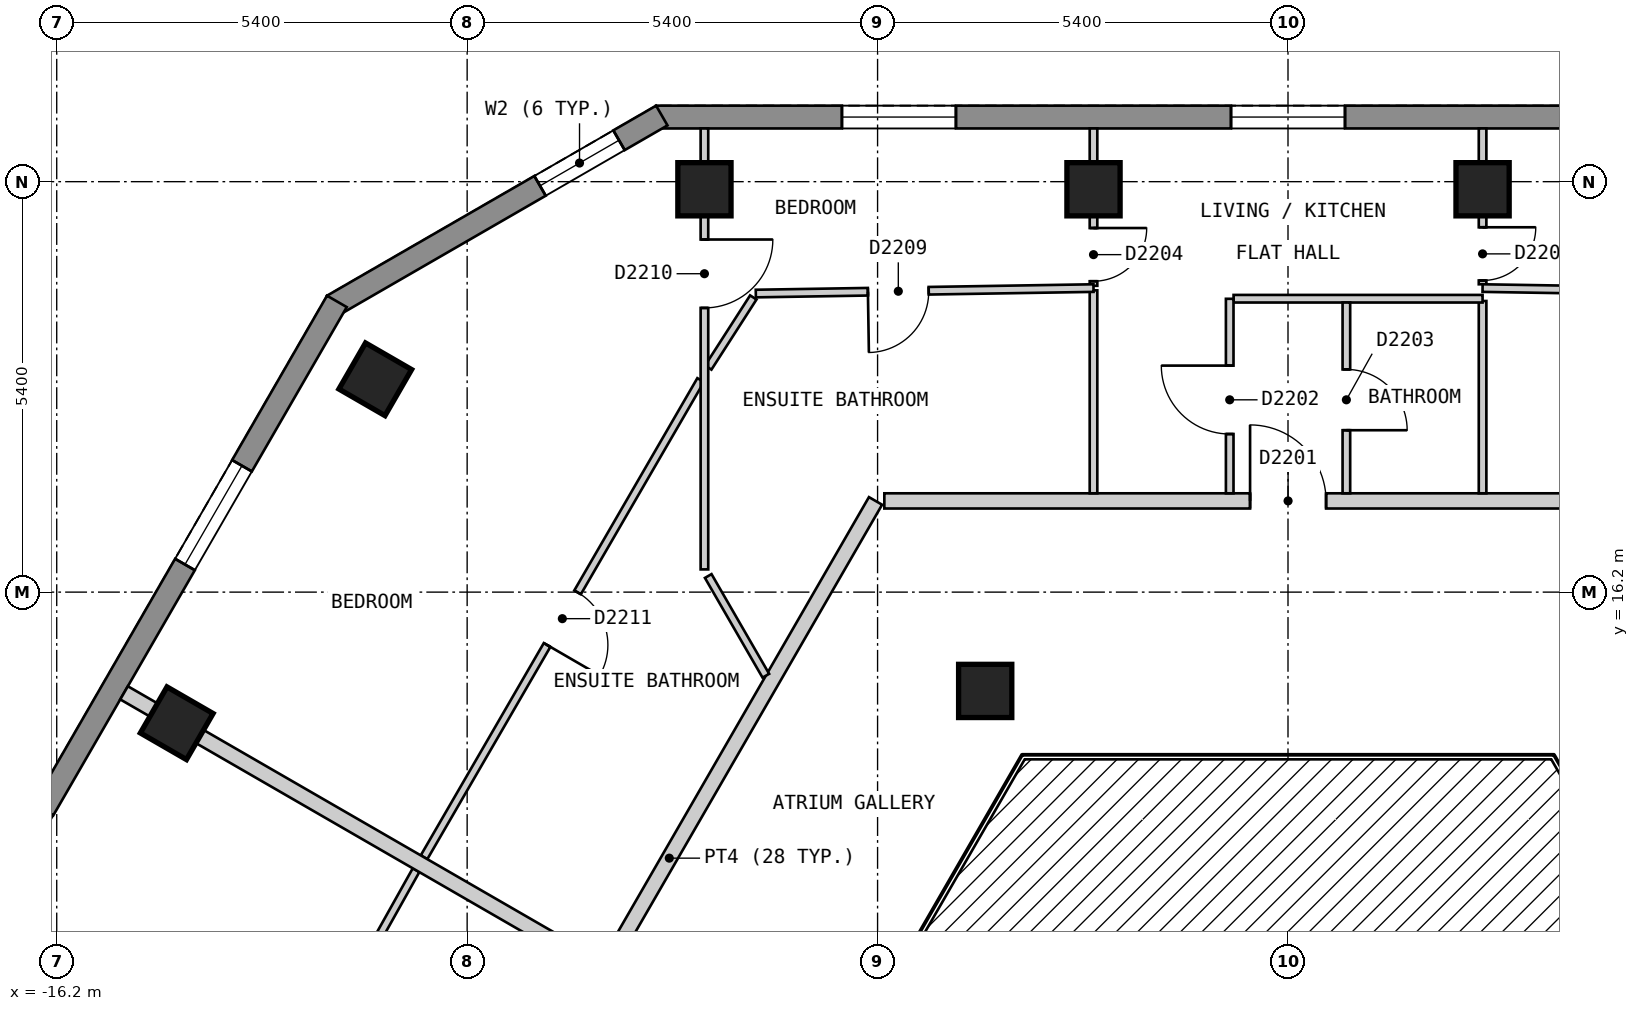
"""IFC4 building model, lengths in metres.
Left out: names, types, materials, properties, quantities, classifications, styles, units other than length and angle.
Written with IfcOpenShell. Run it as: python <this file> out.ifc"""

import sys

from ifc_helpers import new_model, si_unit, direction, frame, frame_2d, origin, origin_2d, place, context, subcontext, project, spatial, polyline, rectangle, outline, extrude, element, fill, save


model = new_model("IFC4")
c1 = context("Model", 3, precision=1e-05, world=origin(), true_north=direction((0.0, 1.0)))
c2 = subcontext(c1, "Body", "Model", "MODEL_VIEW")
j1 = project(units=[si_unit("LENGTHUNIT", "METRE"), si_unit("PLANEANGLEUNIT", "RADIAN")], contexts=[c1])
p1 = place(None, origin())
s1 = spatial("IfcSite", under=j1, at=p1, CompositionType="ELEMENT")
p2 = place(p1, origin())
s2 = spatial("IfcBuilding", under=s1, at=p2, CompositionType="ELEMENT")
p3 = place(p2, frame((0.0, 0.0, 223.8)))
s3 = spatial("IfcBuildingStorey", under=s2, at=p3, CompositionType="ELEMENT", Elevation=223.8)
for number, where, z_axis, x_axis in (
    (1, (2.56, 21.5, 0.0), (0.0, 0.0, 1.0), (-1.0, 0.0, 0.0)),
    (2, (-2.559, 21.5, 0.0), (0.0, 0.0, 1.0), (-1.0, 0.0, 0.0)),
    (3, (-7.678, 21.5, 0.0), (0.0, 0.0, 1.0), (-1.0, 0.0, 0.0)),
    (4, (-12.009, 19.0, 0.0), (0.0, 0.0, 1.0), (-0.5, -0.866, 0.0)),
    (5, (-14.621, 14.475, 0.0), (0.0, 0.0, 1.0), (-0.5, -0.866, 0.0)),
    (6, (-3.984, 14.9, 0.0), (0.0, 0.0, 1.0), (1.0, 0.0, 0.0)),
):
    element("IfcColumn", number, at=place(p3, frame(where, z_axis=z_axis, x_axis=x_axis)), inside=s3, PredefinedType="COLUMN", context=c2, shape_type="SweptSolid", body=[
        extrude(rectangle(XDim=0.7, YDim=0.7, at=origin_2d()), origin(), (0.0, 0.0, 1.0), 3.0),
    ])
p4 = place(p3, frame((8.314, 22.45, 0.0), z_axis=(0.0, 0.0, 1.0), x_axis=(-1.0, 0.0, 0.0)))
e7 = element("IfcWall", 7, at=p4, inside=s3, PredefinedType="SOLIDWALL", context=c2, shape_type="SweptSolid", body=[
    extrude(outline(polyline([(0.0, -0.15), (16.628, -0.15), (16.548, 0.15), (0.08, 0.15), (0.0, -0.15)])), origin(), (0.0, 0.0, 1.0), 2.7),
])
p5 = place(p4, frame((2.444, 0.0, 0.15)))
e8 = element("IfcOpeningElement", 8, at=p5, cuts=e7, PredefinedType="OPENING", context=c2, shape_type="SweptSolid", body=[
    extrude(rectangle(XDim=1.5, YDim=2.1, at=frame_2d((0.75, 1.05))), frame((0.0, 0.16, 0.0), z_axis=(0.0, -1.0, 0.0), x_axis=(1.0, 0.0, 0.0)), (0.0, 0.0, 1.0), 0.32),
])
p6 = place(p4, frame((7.564, 0.0, 0.15)))
e9 = element("IfcOpeningElement", 9, at=p6, cuts=e7, PredefinedType="OPENING", context=c2, shape_type="SweptSolid", body=[
    extrude(rectangle(XDim=1.5, YDim=2.1, at=frame_2d((0.75, 1.05))), frame((0.0, 0.16, 0.0), z_axis=(0.0, -1.0, 0.0), x_axis=(1.0, 0.0, 0.0)), (0.0, 0.0, 1.0), 0.32),
])
p7 = place(p4, frame((12.683, 0.0, 0.15)))
e10 = element("IfcOpeningElement", 10, at=p7, cuts=e7, PredefinedType="OPENING", context=c2, shape_type="SweptSolid", body=[
    extrude(rectangle(XDim=1.5, YDim=2.1, at=frame_2d((0.75, 1.05))), frame((0.0, 0.16, 0.0), z_axis=(0.0, -1.0, 0.0), x_axis=(1.0, 0.0, 0.0)), (0.0, 0.0, 1.0), 0.32),
])
p8 = place(p3, frame((-8.239, 22.47, 0.0), z_axis=(0.0, 0.0, 1.0), x_axis=(-0.866022959057, -0.500004234368, 0.0)))
e11 = element("IfcWall", 11, at=p8, inside=s3, PredefinedType="SOLIDWALL", context=c2, shape_type="SweptSolid", body=[
    extrude(outline(polyline([(0.0, -0.15), (5.0, -0.15), (4.92, 0.15), (0.08, 0.15), (0.0, -0.15)])), origin(), (0.0, 0.0, 1.0), 2.7),
])
p9 = place(p8, frame((0.65, 0.0, 0.15)))
e12 = element("IfcOpeningElement", 12, at=p9, cuts=e11, PredefinedType="OPENING", context=c2, shape_type="SweptSolid", body=[
    extrude(rectangle(XDim=1.2, YDim=2.1, at=frame_2d((0.6, 1.05))), frame((0.0, 0.16, 0.0), z_axis=(0.0, -1.0, 0.0), x_axis=(1.0, 0.0, 0.0)), (0.0, 0.0, 1.0), 0.32),
])
p10 = place(p3, frame((-12.514, 20.025, 0.0), z_axis=(0.0, 0.0, 1.0), x_axis=(-0.500003656944, -0.866023292436, 0.0)))
e13 = element("IfcWall", 13, at=p10, inside=s3, PredefinedType="SOLIDWALL", context=c2, shape_type="SweptSolid", body=[
    extrude(outline(polyline([(0.0, -0.15), (22.17, -0.15), (22.09, 0.15), (0.08, 0.15), (0.0, -0.15)])), origin(), (0.0, 0.0, 1.0), 2.7),
])
p11 = place(p10, frame((2.497, 0.0, 0.15)))
e14 = element("IfcOpeningElement", 14, at=p11, cuts=e13, PredefinedType="OPENING", context=c2, shape_type="SweptSolid", body=[
    extrude(rectangle(XDim=1.5, YDim=2.1, at=frame_2d((0.75, 1.05))), frame((0.0, 0.16, 0.0), z_axis=(0.0, -1.0, 0.0), x_axis=(1.0, 0.0, 0.0)), (0.0, 0.0, 1.0), 0.32),
])
p12 = place(p10, frame((7.722, 0.0, 0.15)))
e15 = element("IfcOpeningElement", 15, at=p12, cuts=e13, PredefinedType="OPENING", context=c2, shape_type="SweptSolid", body=[
    extrude(rectangle(XDim=1.5, YDim=2.1, at=frame_2d((0.75, 1.05))), frame((0.0, 0.16, 0.0), z_axis=(0.0, -1.0, 0.0), x_axis=(1.0, 0.0, 0.0)), (0.0, 0.0, 1.0), 0.32),
])
p13 = place(p10, frame((12.948, 0.0, 0.15)))
e16 = element("IfcOpeningElement", 16, at=p13, cuts=e13, PredefinedType="OPENING", context=c2, shape_type="SweptSolid", body=[
    extrude(rectangle(XDim=1.5, YDim=2.1, at=frame_2d((0.75, 1.05))), frame((0.0, 0.16, 0.0), z_axis=(0.0, -1.0, 0.0), x_axis=(1.0, 0.0, 0.0)), (0.0, 0.0, 1.0), 0.32),
])
p14 = place(p10, frame((18.173, 0.0, 0.15)))
e17 = element("IfcOpeningElement", 17, at=p14, cuts=e13, PredefinedType="OPENING", context=c2, shape_type="SweptSolid", body=[
    extrude(rectangle(XDim=1.5, YDim=2.1, at=frame_2d((0.75, 1.05))), frame((0.0, 0.16, 0.0), z_axis=(0.0, -1.0, 0.0), x_axis=(1.0, 0.0, 0.0)), (0.0, 0.0, 1.0), 0.32),
])
p15 = place(p3, frame((-5.311, 17.4, 0.0), z_axis=(0.0, 0.0, 1.0), x_axis=(1.0, 0.0, 0.0)))
e18 = element("IfcWall", 18, at=p15, inside=s3, PredefinedType="PARTITIONING", context=c2, shape_type="SweptSolid", body=[
    extrude(rectangle(XDim=10.737, YDim=0.2, at=frame_2d((5.369, 0.0))), origin(), (0.0, 0.0, 1.0), 2.7),
])
p16 = place(p15, frame((4.812, 0.0, 0.0)))
e19 = element("IfcOpeningElement", 19, at=p16, cuts=e18, PredefinedType="OPENING", context=c2, shape_type="SweptSolid", body=[
    extrude(rectangle(XDim=1.0, YDim=2.1, at=frame_2d((0.5, 1.05))), frame((0.0, 0.11, 0.0), z_axis=(0.0, -1.0, 0.0), x_axis=(1.0, 0.0, 0.0)), (0.0, 0.0, 1.0), 0.22),
])
p17 = place(p3, frame((-10.854, 8.0, 0.0), z_axis=(0.0, 0.0, 1.0), x_axis=(0.499997637144, 0.866026767976, 0.0)))
e20 = element("IfcWall", 20, at=p17, inside=s3, PredefinedType="PARTITIONING", context=c2, shape_type="SweptSolid", body=[
    extrude(rectangle(XDim=10.854, YDim=0.2, at=frame_2d((5.427, 0.0))), origin(), (0.0, 0.0, 1.0), 2.7),
])
p18 = place(p3, frame((-7.628, 16.412, 0.0), z_axis=(0.0, 0.0, 1.0), x_axis=(0.500159472144, -0.86593331292, 0.0)))
e21 = element("IfcWall", 21, at=p18, inside=s3, PredefinedType="PARTITIONING", context=c2, shape_type="SweptSolid", body=[
    extrude(rectangle(XDim=1.515, YDim=0.1, at=frame_2d((0.758, 0.0))), origin(), (0.0, 0.0, 1.0), 2.7),
])
p19 = place(p3, frame((-2.559, 20.17, 0.0), z_axis=(0.0, 0.0, 1.0), x_axis=(0.0, -1.0, 0.0)))
e22 = element("IfcWall", 22, at=p19, inside=s3, PredefinedType="PARTITIONING", context=c2, shape_type="SweptSolid", body=[
    extrude(rectangle(XDim=2.67, YDim=0.1, at=frame_2d((1.335, 0.0))), origin(), (0.0, 0.0, 1.0), 2.7),
])
p20 = place(p3, frame((2.56, 22.3, 0.0), z_axis=(0.0, 0.0, 1.0), x_axis=(0.0, -1.0, 0.0)))
e23 = element("IfcWall", 23, at=p20, inside=s3, PredefinedType="PARTITIONING", context=c2, shape_type="SweptSolid", body=[
    extrude(rectangle(XDim=2.05, YDim=0.1, at=frame_2d((1.025, 0.0))), origin(), (0.0, 0.0, 1.0), 2.7),
])
p21 = place(p20, frame((1.3, 0.0, 0.0)))
e24 = element("IfcOpeningElement", 24, at=p21, cuts=e23, PredefinedType="OPENING", context=c2, shape_type="SweptSolid", body=[
    extrude(rectangle(XDim=0.7, YDim=2.1, at=frame_2d((0.35, 1.05))), frame((0.0, 0.06, 0.0), z_axis=(0.0, -1.0, 0.0), x_axis=(1.0, 0.0, 0.0)), (0.0, 0.0, 1.0), 0.12),
])
p22 = place(p3, frame((2.56, 20.03, 0.0), z_axis=(0.0, 0.0, 1.0), x_axis=(0.0, -1.0, 0.0)))
e25 = element("IfcWall", 25, at=p22, inside=s3, PredefinedType="PARTITIONING", context=c2, shape_type="SweptSolid", body=[
    extrude(rectangle(XDim=2.53, YDim=0.1, at=frame_2d((1.265, 0.0))), origin(), (0.0, 0.0, 1.0), 2.7),
])
p23 = place(p3, frame((2.56, 20.2, 0.0), z_axis=(0.0, 0.0, 1.0), x_axis=(0.999868576801, -0.016212005615, 0.0)))
e26 = element("IfcWall", 26, at=p23, inside=s3, PredefinedType="PARTITIONING", context=c2, shape_type="SweptSolid", body=[
    extrude(rectangle(XDim=4.442, YDim=0.1, at=frame_2d((2.221, 0.0))), origin(), (0.0, 0.0, 1.0), 2.7),
])
p24 = place(p23, frame((2.746, 0.0, 0.0)))
e27 = element("IfcOpeningElement", 27, at=p24, cuts=e26, PredefinedType="OPENING", context=c2, shape_type="SweptSolid", body=[
    extrude(rectangle(XDim=0.8, YDim=2.1, at=frame_2d((0.4, 1.05))), frame((0.0, 0.06, 0.0), z_axis=(0.0, -1.0, 0.0), x_axis=(1.0, 0.0, 0.0)), (0.0, 0.0, 1.0), 0.12),
])
p25 = place(p3, frame((-0.716, 20.06, 0.0), z_axis=(0.0, 0.0, 1.0), x_axis=(1.0, 0.0, 0.0)))
e28 = element("IfcWall", 28, at=p25, inside=s3, PredefinedType="PARTITIONING", context=c2, shape_type="SweptSolid", body=[
    extrude(rectangle(XDim=3.276, YDim=0.1, at=frame_2d((1.638, 0.0))), origin(), (0.0, 0.0, 1.0), 2.7),
])
p26 = place(p3, frame((-7.628, 19.154, 0.0), z_axis=(0.0, 0.0, 1.0), x_axis=(0.540600102017, 0.841279697663, 0.0)))
e29 = element("IfcWall", 29, at=p26, inside=s3, PredefinedType="PARTITIONING", context=c2, shape_type="SweptSolid", body=[
    extrude(rectangle(XDim=1.097, YDim=0.1, at=frame_2d((0.548, 0.0))), origin(), (0.0, 0.0, 1.0), 2.7),
])
p27 = place(p3, frame((-11.367, 12.712, 0.0), z_axis=(0.0, 0.0, 1.0), x_axis=(0.501473866443, 0.865172792727, 0.0)))
e30 = element("IfcWall", 30, at=p27, inside=s3, PredefinedType="PARTITIONING", context=c2, shape_type="SweptSolid", body=[
    extrude(rectangle(XDim=7.256, YDim=0.1, at=frame_2d((3.628, 0.0))), origin(), (0.0, 0.0, 1.0), 2.7),
])
p28 = place(p27, frame((3.228, 0.0, 0.0)))
e31 = element("IfcOpeningElement", 31, at=p28, cuts=e30, PredefinedType="OPENING", context=c2, shape_type="SweptSolid", body=[
    extrude(rectangle(XDim=0.8, YDim=2.1, at=frame_2d((0.4, 1.05))), frame((0.0, 0.06, 0.0), z_axis=(0.0, -1.0, 0.0), x_axis=(1.0, 0.0, 0.0)), (0.0, 0.0, 1.0), 0.12),
])
p29 = place(p3, frame((-13.952, 8.113, 0.0), z_axis=(0.0, 0.0, 1.0), x_axis=(0.488568218554, 0.872525699231, 0.0)))
e32 = element("IfcWall", 32, at=p29, inside=s3, PredefinedType="PARTITIONING", context=c2, shape_type="SweptSolid", body=[
    extrude(rectangle(XDim=5.076, YDim=0.1, at=frame_2d((2.538, 0.0))), origin(), (0.0, 0.0, 1.0), 2.7),
])
p30 = place(p29, frame((2.163, 0.0, 0.0)))
e33 = element("IfcOpeningElement", 33, at=p30, cuts=e32, PredefinedType="OPENING", context=c2, shape_type="SweptSolid", body=[
    extrude(rectangle(XDim=0.8, YDim=2.1, at=frame_2d((0.4, 1.05))), frame((0.0, 0.06, 0.0), z_axis=(0.0, -1.0, 0.0), x_axis=(1.0, 0.0, 0.0)), (0.0, 0.0, 1.0), 0.12),
])
p31 = place(p3, frame((0.768, 17.5, 0.0), z_axis=(0.0, 0.0, 1.0), x_axis=(0.0, 1.0, 0.0)))
e34 = element("IfcWall", 34, at=p31, inside=s3, PredefinedType="PARTITIONING", context=c2, shape_type="SweptSolid", body=[
    extrude(rectangle(XDim=2.51, YDim=0.1, at=frame_2d((1.255, 0.0))), origin(), (0.0, 0.0, 1.0), 2.7),
])
p32 = place(p31, frame((0.83, 0.0, 0.0)))
e35 = element("IfcOpeningElement", 35, at=p32, cuts=e34, PredefinedType="OPENING", context=c2, shape_type="SweptSolid", body=[
    extrude(rectangle(XDim=0.8, YDim=2.1, at=frame_2d((0.4, 1.05))), frame((0.0, 0.06, 0.0), z_axis=(0.0, -1.0, 0.0), x_axis=(1.0, 0.0, 0.0)), (0.0, 0.0, 1.0), 0.12),
])
p33 = place(p3, frame((-7.678, 16.499, 0.0), z_axis=(0.0, 0.0, 1.0), x_axis=(0.0, 1.0, 0.0)))
e36 = element("IfcWall", 36, at=p33, inside=s3, PredefinedType="PARTITIONING", context=c2, shape_type="SweptSolid", body=[
    extrude(rectangle(XDim=5.801, YDim=0.1, at=frame_2d((2.9, 0.0))), origin(), (0.0, 0.0, 1.0), 2.7),
])
p34 = place(p33, frame((3.44, 0.0, 0.0)))
e37 = element("IfcOpeningElement", 37, at=p34, cuts=e36, PredefinedType="OPENING", context=c2, shape_type="SweptSolid", body=[
    extrude(rectangle(XDim=0.9, YDim=2.1, at=frame_2d((0.45, 1.05))), frame((0.0, 0.06, 0.0), z_axis=(0.0, -1.0, 0.0), x_axis=(1.0, 0.0, 0.0)), (0.0, 0.0, 1.0), 0.12),
])
p35 = place(p3, frame((-0.767, 17.5, 0.0), z_axis=(0.0, 0.0, 1.0), x_axis=(0.0, 1.0, 0.0)))
e38 = element("IfcWall", 38, at=p35, inside=s3, PredefinedType="PARTITIONING", context=c2, shape_type="SweptSolid", body=[
    extrude(rectangle(XDim=2.559, YDim=0.1, at=frame_2d((1.28, 0.0))), origin(), (0.0, 0.0, 1.0), 2.7),
])
p36 = place(p35, frame((0.78, 0.0, 0.0)))
e39 = element("IfcOpeningElement", 39, at=p36, cuts=e38, PredefinedType="OPENING", context=c2, shape_type="SweptSolid", body=[
    extrude(rectangle(XDim=0.9, YDim=2.1, at=frame_2d((0.45, 1.05))), frame((0.0, 0.06, 0.0), z_axis=(0.0, -1.0, 0.0), x_axis=(1.0, 0.0, 0.0)), (0.0, 0.0, 1.0), 0.12),
])
p37 = place(p3, frame((-2.559, 20.23, 0.0), z_axis=(0.0, 0.0, 1.0), x_axis=(0.0, 1.0, 0.0)))
e40 = element("IfcWall", 40, at=p37, inside=s3, PredefinedType="PARTITIONING", context=c2, shape_type="SweptSolid", body=[
    extrude(rectangle(XDim=2.07, YDim=0.1, at=frame_2d((1.035, 0.0))), origin(), (0.0, 0.0, 1.0), 2.7),
])
p38 = place(p37, frame((0.06, 0.0, 0.0)))
e41 = element("IfcOpeningElement", 41, at=p38, cuts=e40, PredefinedType="OPENING", context=c2, shape_type="SweptSolid", body=[
    extrude(rectangle(XDim=0.7, YDim=2.1, at=frame_2d((0.35, 1.05))), frame((0.0, 0.06, 0.0), z_axis=(0.0, -1.0, 0.0), x_axis=(1.0, 0.0, 0.0)), (0.0, 0.0, 1.0), 0.12),
])
p39 = place(p3, frame((-7.002, 20.128, 0.0), z_axis=(0.0, 0.0, 1.0), x_axis=(0.999868634558, 0.016208443081, 0.0)))
e42 = element("IfcWall", 42, at=p39, inside=s3, PredefinedType="PARTITIONING", context=c2, shape_type="SweptSolid", body=[
    extrude(rectangle(XDim=4.443, YDim=0.1, at=frame_2d((2.222, 0.0))), origin(), (0.0, 0.0, 1.0), 2.7),
])
p40 = place(p39, frame((1.475, 0.0, 0.0)))
e43 = element("IfcOpeningElement", 43, at=p40, cuts=e42, PredefinedType="OPENING", context=c2, shape_type="SweptSolid", body=[
    extrude(rectangle(XDim=0.8, YDim=2.1, at=frame_2d((0.4, 1.05))), frame((0.0, 0.06, 0.0), z_axis=(0.0, -1.0, 0.0), x_axis=(1.0, 0.0, 0.0)), (0.0, 0.0, 1.0), 0.12),
])
p41 = place(p3, frame((-15.314, 14.875, 0.0), z_axis=(0.0, 0.0, 1.0), x_axis=(0.866001485781, -0.500041424909, 0.0)))
e44 = element("IfcWall", 44, at=p41, inside=s3, PredefinedType="PARTITIONING", context=c2, shape_type="SweptSolid", body=[
    extrude(rectangle(XDim=7.2, YDim=0.2, at=frame_2d((3.6, 0.0))), origin(), (0.0, 0.0, 1.0), 2.7),
])
p42 = place(p6, origin())
e45 = element("IfcWindow", 45, at=p42, inside=s3, PartitioningType="SINGLE_PANEL", PredefinedType="WINDOW", context=c2, shape_type="SweptSolid", body=[
    extrude(rectangle(XDim=1.5, YDim=2.1, at=frame_2d((0.75, 1.05))), frame((0.0, 0.03, 0.0), z_axis=(0.0, -1.0, 0.0), x_axis=(1.0, 0.0, 0.0)), (0.0, 0.0, 1.0), 0.06),
])
fill(e9, e45)
p43 = place(p7, origin())
e46 = element("IfcWindow", 46, at=p43, inside=s3, PartitioningType="SINGLE_PANEL", PredefinedType="WINDOW", context=c2, shape_type="SweptSolid", body=[
    extrude(rectangle(XDim=1.5, YDim=2.1, at=frame_2d((0.75, 1.05))), frame((0.0, 0.03, 0.0), z_axis=(0.0, -1.0, 0.0), x_axis=(1.0, 0.0, 0.0)), (0.0, 0.0, 1.0), 0.06),
])
fill(e10, e46)
p44 = place(p9, origin())
e47 = element("IfcWindow", 47, at=p44, inside=s3, PartitioningType="SINGLE_PANEL", PredefinedType="WINDOW", context=c2, shape_type="SweptSolid", body=[
    extrude(rectangle(XDim=1.2, YDim=2.1, at=frame_2d((0.6, 1.05))), frame((0.0, 0.03, 0.0), z_axis=(0.0, -1.0, 0.0), x_axis=(1.0, 0.0, 0.0)), (0.0, 0.0, 1.0), 0.06),
])
fill(e12, e47)
p45 = place(p11, origin())
e48 = element("IfcWindow", 48, at=p45, inside=s3, PartitioningType="SINGLE_PANEL", PredefinedType="WINDOW", context=c2, shape_type="SweptSolid", body=[
    extrude(rectangle(XDim=1.5, YDim=2.1, at=frame_2d((0.75, 1.05))), frame((0.0, 0.03, 0.0), z_axis=(0.0, -1.0, 0.0), x_axis=(1.0, 0.0, 0.0)), (0.0, 0.0, 1.0), 0.06),
])
fill(e14, e48)
p46 = place(p16, origin())
e49 = element("IfcDoor", 49, at=p46, inside=s3, OperationType="SINGLE_SWING_LEFT", PredefinedType="DOOR", context=c2, shape_type="SweptSolid", body=[
    extrude(rectangle(XDim=1.0, YDim=2.1, at=frame_2d((0.5, 1.05))), frame((0.0, 0.025, 0.0), z_axis=(0.0, -1.0, 0.0), x_axis=(1.0, 0.0, 0.0)), (0.0, 0.0, 1.0), 0.05),
])
fill(e19, e49)
p47 = place(p36, origin())
e50 = element("IfcDoor", 50, at=p47, inside=s3, OperationType="SINGLE_SWING_RIGHT", PredefinedType="DOOR", context=c2, shape_type="SweptSolid", body=[
    extrude(rectangle(XDim=0.9, YDim=2.1, at=frame_2d((0.45, 1.05))), frame((0.0, 0.025, 0.0), z_axis=(0.0, -1.0, 0.0), x_axis=(1.0, 0.0, 0.0)), (0.0, 0.0, 1.0), 0.05),
])
fill(e39, e50)
p48 = place(p32, origin())
e51 = element("IfcDoor", 51, at=p48, inside=s3, OperationType="SINGLE_SWING_LEFT", PredefinedType="DOOR", context=c2, shape_type="SweptSolid", body=[
    extrude(rectangle(XDim=0.8, YDim=2.1, at=frame_2d((0.4, 1.05))), frame((0.0, 0.025, 0.0), z_axis=(0.0, -1.0, 0.0), x_axis=(1.0, 0.0, 0.0)), (0.0, 0.0, 1.0), 0.05),
])
fill(e35, e51)
p49 = place(p38, origin())
e52 = element("IfcDoor", 52, at=p49, inside=s3, OperationType="SINGLE_SWING_RIGHT", PredefinedType="DOOR", context=c2, shape_type="SweptSolid", body=[
    extrude(rectangle(XDim=0.7, YDim=2.1, at=frame_2d((0.35, 1.05))), frame((0.0, 0.025, 0.0), z_axis=(0.0, -1.0, 0.0), x_axis=(1.0, 0.0, 0.0)), (0.0, 0.0, 1.0), 0.05),
])
fill(e41, e52)
p50 = place(p21, origin())
e53 = element("IfcDoor", 53, at=p50, inside=s3, OperationType="SINGLE_SWING_LEFT", PredefinedType="DOOR", context=c2, shape_type="SweptSolid", body=[
    extrude(rectangle(XDim=0.7, YDim=2.1, at=frame_2d((0.35, 1.05))), frame((0.0, 0.025, 0.0), z_axis=(0.0, -1.0, 0.0), x_axis=(1.0, 0.0, 0.0)), (0.0, 0.0, 1.0), 0.05),
])
fill(e24, e53)
p51 = place(p40, origin())
e54 = element("IfcDoor", 54, at=p51, inside=s3, OperationType="SINGLE_SWING_LEFT", PredefinedType="DOOR", context=c2, shape_type="SweptSolid", body=[
    extrude(rectangle(XDim=0.8, YDim=2.1, at=frame_2d((0.4, 1.05))), frame((0.0, 0.025, 0.0), z_axis=(0.0, -1.0, 0.0), x_axis=(1.0, 0.0, 0.0)), (0.0, 0.0, 1.0), 0.05),
])
fill(e43, e54)
p52 = place(p34, origin())
e55 = element("IfcDoor", 55, at=p52, inside=s3, OperationType="SINGLE_SWING_RIGHT", PredefinedType="DOOR", context=c2, shape_type="SweptSolid", body=[
    extrude(rectangle(XDim=0.9, YDim=2.1, at=frame_2d((0.45, 1.05))), frame((0.0, 0.025, 0.0), z_axis=(0.0, -1.0, 0.0), x_axis=(1.0, 0.0, 0.0)), (0.0, 0.0, 1.0), 0.05),
])
fill(e37, e55)
p53 = place(p28, origin())
e56 = element("IfcDoor", 56, at=p53, inside=s3, OperationType="SINGLE_SWING_LEFT", PredefinedType="DOOR", context=c2, shape_type="SweptSolid", body=[
    extrude(rectangle(XDim=0.8, YDim=2.1, at=frame_2d((0.4, 1.05))), frame((0.0, 0.025, 0.0), z_axis=(0.0, -1.0, 0.0), x_axis=(1.0, 0.0, 0.0)), (0.0, 0.0, 1.0), 0.05),
])
fill(e31, e56)
save(model, sys.argv[1])
